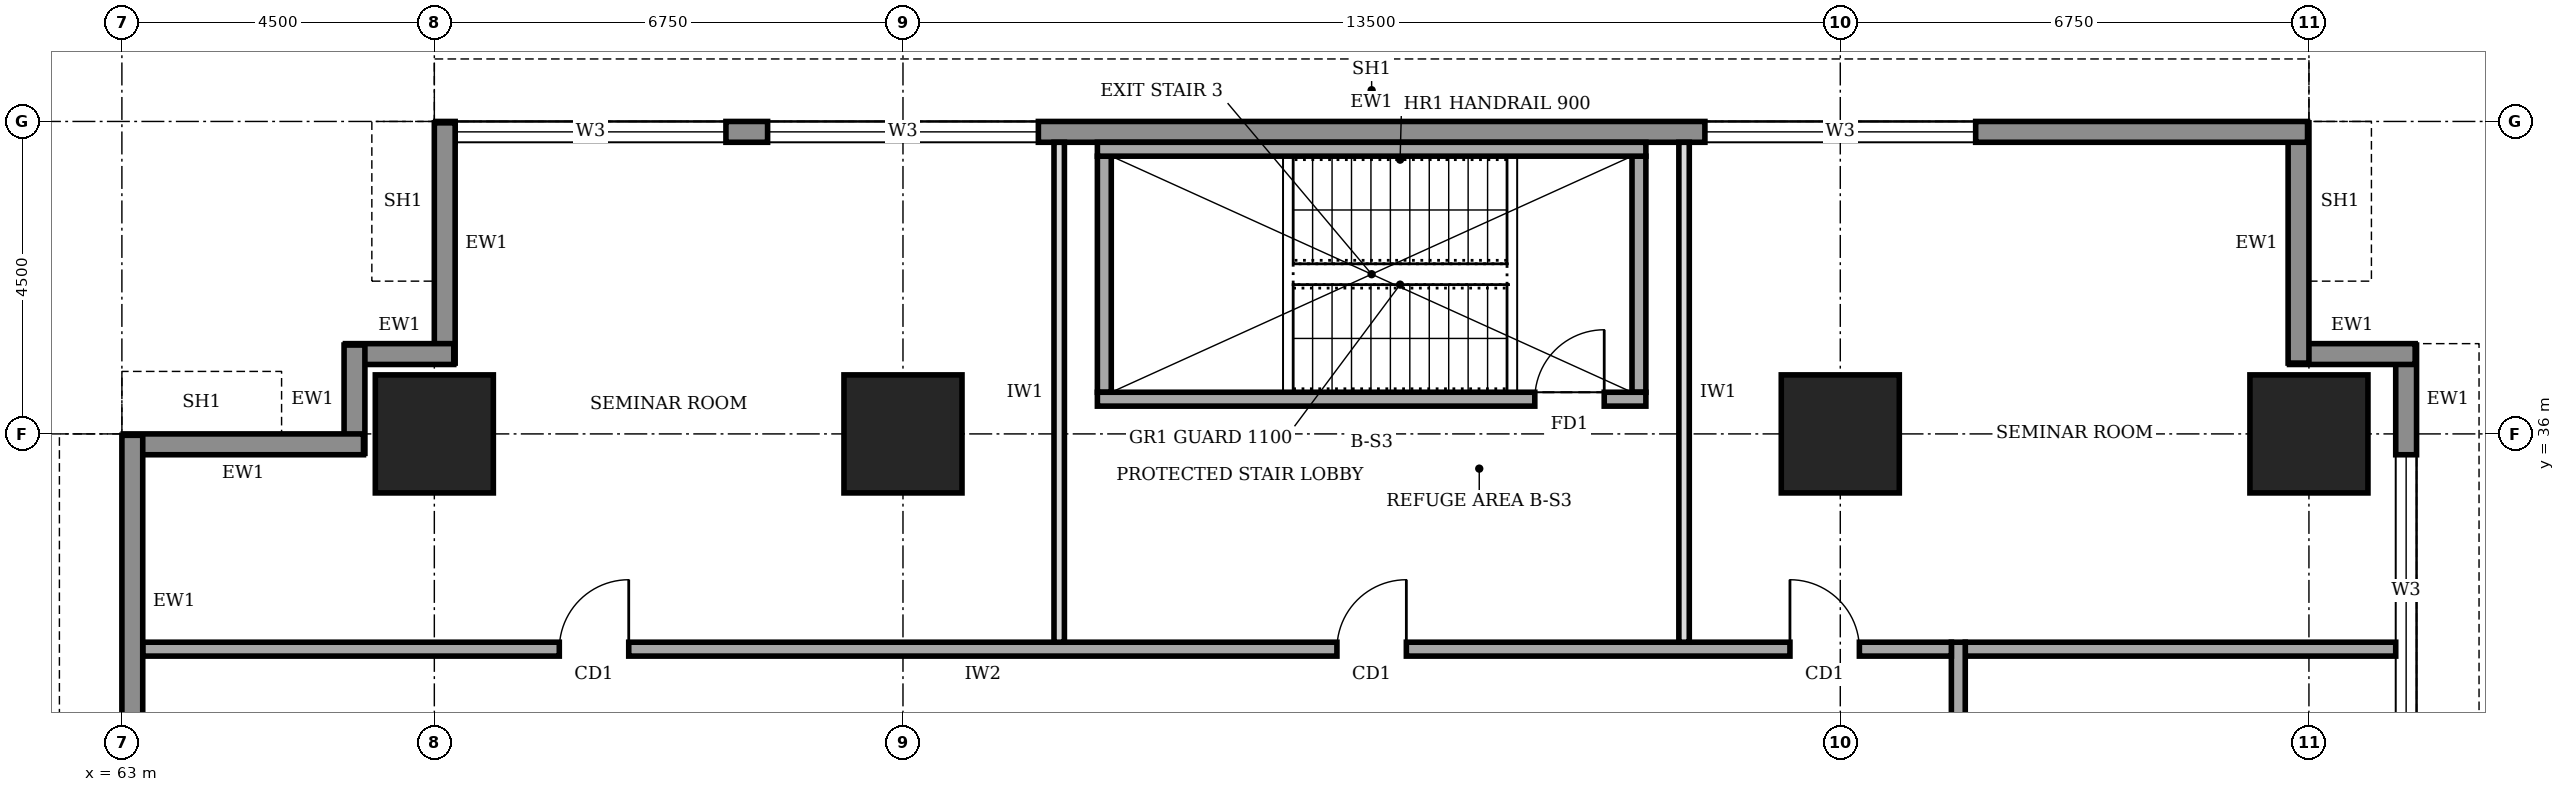
"""IFC4 building model, lengths in metres.
Left out: names, types, materials, properties, quantities, classifications, styles, units other than length and angle.
Written with IfcOpenShell. Run it as: python <this file> out.ifc"""

import sys

from ifc_helpers import new_model, si_unit, direction, frame, frame_2d, origin, origin_2d, place, context, subcontext, project, spatial, rectangle, extrude, element, fill, save


model = new_model("IFC4")
c1 = context("Model", 3, precision=1e-05, world=origin(), true_north=direction((0.0, 1.0)))
c2 = subcontext(c1, "Body", "Model", "MODEL_VIEW")
j1 = project(units=[si_unit("LENGTHUNIT", "METRE"), si_unit("PLANEANGLEUNIT", "RADIAN")], contexts=[c1])
p1 = place(None, origin())
s1 = spatial("IfcSite", under=j1, at=p1, CompositionType="ELEMENT")
p2 = place(p1, origin())
s2 = spatial("IfcBuilding", under=s1, at=p2, CompositionType="ELEMENT")
p3 = place(p2, frame((0.0, 0.0, 85.0)))
s3 = spatial("IfcBuildingStorey", under=s2, at=p3, CompositionType="ELEMENT", Elevation=85.0)
for number, where, z_axis, x_axis in (
    (1, (67.5, 36.0, 0.0), (0.0, 0.0, 1.0), (1.0, 0.0, 0.0)),
    (2, (74.25, 36.0, 0.0), (0.0, 0.0, 1.0), (1.0, 0.0, 0.0)),
    (3, (87.75, 36.0, 0.0), (0.0, 0.0, 1.0), (1.0, 0.0, 0.0)),
    (4, (94.5, 36.0, 0.0), (0.0, 0.0, 1.0), (1.0, 0.0, 0.0)),
):
    element("IfcColumn", number, at=place(p3, frame(where, z_axis=z_axis, x_axis=x_axis)), inside=s3, PredefinedType="COLUMN", context=c2, shape_type="SweptSolid", body=[
        extrude(rectangle(XDim=1.7, YDim=1.7, at=origin_2d()), origin(), (0.0, 0.0, 1.0), 4.0),
    ])
p4 = place(p3, frame((95.9, 3.32, 0.0), z_axis=(0.0, 0.0, 1.0), x_axis=(0.0, 1.0, 0.0)))
e5 = element("IfcWall", 5, at=p4, inside=s3, PredefinedType="STANDARD", context=c2, shape_type="SweptSolid", body=[
    extrude(rectangle(XDim=33.96, YDim=0.3, at=frame_2d((16.98, 0.0))), origin(), (0.0, 0.0, 1.0), 3.75),
])
p5 = place(p4, frame((1.48, 0.0, 0.95)))
e6 = element("IfcOpeningElement", 6, at=p5, cuts=e5, PredefinedType="OPENING", context=c2, shape_type="SweptSolid", body=[
    extrude(rectangle(XDim=3.9, YDim=1.8, at=frame_2d((1.95, 0.9))), frame((0.0, 0.16, 0.0), z_axis=(0.0, -1.0, 0.0), x_axis=(1.0, 0.0, 0.0)), (0.0, 0.0, 1.0), 0.32),
])
p6 = place(p4, frame((5.98, 0.0, 0.95)))
e7 = element("IfcOpeningElement", 7, at=p6, cuts=e5, PredefinedType="OPENING", context=c2, shape_type="SweptSolid", body=[
    extrude(rectangle(XDim=3.9, YDim=1.8, at=frame_2d((1.95, 0.9))), frame((0.0, 0.16, 0.0), z_axis=(0.0, -1.0, 0.0), x_axis=(1.0, 0.0, 0.0)), (0.0, 0.0, 1.0), 0.32),
])
p7 = place(p4, frame((10.48, 0.0, 0.95)))
e8 = element("IfcOpeningElement", 8, at=p7, cuts=e5, PredefinedType="OPENING", context=c2, shape_type="SweptSolid", body=[
    extrude(rectangle(XDim=3.9, YDim=1.8, at=frame_2d((1.95, 0.9))), frame((0.0, 0.16, 0.0), z_axis=(0.0, -1.0, 0.0), x_axis=(1.0, 0.0, 0.0)), (0.0, 0.0, 1.0), 0.32),
])
p8 = place(p4, frame((14.98, 0.0, 0.95)))
e9 = element("IfcOpeningElement", 9, at=p8, cuts=e5, PredefinedType="OPENING", context=c2, shape_type="SweptSolid", body=[
    extrude(rectangle(XDim=3.9, YDim=1.8, at=frame_2d((1.95, 0.9))), frame((0.0, 0.16, 0.0), z_axis=(0.0, -1.0, 0.0), x_axis=(1.0, 0.0, 0.0)), (0.0, 0.0, 1.0), 0.32),
])
p9 = place(p4, frame((19.48, 0.0, 0.95)))
e10 = element("IfcOpeningElement", 10, at=p9, cuts=e5, PredefinedType="OPENING", context=c2, shape_type="SweptSolid", body=[
    extrude(rectangle(XDim=3.9, YDim=1.8, at=frame_2d((1.95, 0.9))), frame((0.0, 0.16, 0.0), z_axis=(0.0, -1.0, 0.0), x_axis=(1.0, 0.0, 0.0)), (0.0, 0.0, 1.0), 0.32),
])
p10 = place(p4, frame((23.98, 0.0, 0.95)))
e11 = element("IfcOpeningElement", 11, at=p10, cuts=e5, PredefinedType="OPENING", context=c2, shape_type="SweptSolid", body=[
    extrude(rectangle(XDim=3.9, YDim=1.8, at=frame_2d((1.95, 0.9))), frame((0.0, 0.16, 0.0), z_axis=(0.0, -1.0, 0.0), x_axis=(1.0, 0.0, 0.0)), (0.0, 0.0, 1.0), 0.32),
])
p11 = place(p4, frame((28.48, 0.0, 0.95)))
e12 = element("IfcOpeningElement", 12, at=p11, cuts=e5, PredefinedType="OPENING", context=c2, shape_type="SweptSolid", body=[
    extrude(rectangle(XDim=3.9, YDim=1.8, at=frame_2d((1.95, 0.9))), frame((0.0, 0.16, 0.0), z_axis=(0.0, -1.0, 0.0), x_axis=(1.0, 0.0, 0.0)), (0.0, 0.0, 1.0), 0.32),
])
p12 = place(p3, frame((96.03, 37.15, 0.0), z_axis=(0.0, 0.0, 1.0), x_axis=(-1.0, 0.0, 0.0)))
e13 = element("IfcWall", 13, at=p12, inside=s3, PredefinedType="STANDARD", context=c2, shape_type="SweptSolid", body=[
    extrude(rectangle(XDim=1.81, YDim=0.3, at=frame_2d((0.905, 0.0))), origin(), (0.0, 0.0, 1.0), 3.75),
])
p13 = place(p3, frame((94.35, 37.02, 0.0), z_axis=(0.0, 0.0, 1.0), x_axis=(0.0, 1.0, 0.0)))
e14 = element("IfcWall", 14, at=p13, inside=s3, PredefinedType="STANDARD", context=c2, shape_type="SweptSolid", body=[
    extrude(rectangle(XDim=3.46, YDim=0.3, at=frame_2d((1.73, 0.0))), origin(), (0.0, 0.0, 1.0), 2.85),
])
p14 = place(p3, frame((94.48, 40.35, 0.0), z_axis=(0.0, 0.0, 1.0), x_axis=(-1.0, 0.0, 0.0)))
e15 = element("IfcWall", 15, at=p14, inside=s3, PredefinedType="STANDARD", context=c2, shape_type="SweptSolid", body=[
    extrude(rectangle(XDim=26.96, YDim=0.3, at=frame_2d((13.48, 0.0))), origin(), (0.0, 0.0, 1.0), 3.75),
])
p15 = place(p14, frame((22.78, 0.0, 0.95)))
e16 = element("IfcOpeningElement", 16, at=p15, cuts=e15, PredefinedType="OPENING", context=c2, shape_type="SweptSolid", body=[
    extrude(rectangle(XDim=3.9, YDim=1.8, at=frame_2d((1.95, 0.9))), frame((0.0, 0.16, 0.0), z_axis=(0.0, -1.0, 0.0), x_axis=(1.0, 0.0, 0.0)), (0.0, 0.0, 1.0), 0.32),
])
p16 = place(p14, frame((18.28, 0.0, 0.95)))
e17 = element("IfcOpeningElement", 17, at=p16, cuts=e15, PredefinedType="OPENING", context=c2, shape_type="SweptSolid", body=[
    extrude(rectangle(XDim=3.9, YDim=1.8, at=frame_2d((1.95, 0.9))), frame((0.0, 0.16, 0.0), z_axis=(0.0, -1.0, 0.0), x_axis=(1.0, 0.0, 0.0)), (0.0, 0.0, 1.0), 0.32),
])
p17 = place(p14, frame((4.78, 0.0, 0.95)))
e18 = element("IfcOpeningElement", 18, at=p17, cuts=e15, PredefinedType="OPENING", context=c2, shape_type="SweptSolid", body=[
    extrude(rectangle(XDim=3.9, YDim=1.8, at=frame_2d((1.95, 0.9))), frame((0.0, 0.16, 0.0), z_axis=(0.0, -1.0, 0.0), x_axis=(1.0, 0.0, 0.0)), (0.0, 0.0, 1.0), 0.32),
])
p18 = place(p3, frame((67.65, 40.48, 0.0), z_axis=(0.0, 0.0, 1.0), x_axis=(0.0, -1.0, 0.0)))
e19 = element("IfcWall", 19, at=p18, inside=s3, PredefinedType="STANDARD", context=c2, shape_type="SweptSolid", body=[
    extrude(rectangle(XDim=3.46, YDim=0.3, at=frame_2d((1.73, 0.0))), origin(), (0.0, 0.0, 1.0), 2.85),
])
for number, where, z_axis, x_axis in (
    (20, (67.78, 37.15, 0.0), (0.0, 0.0, 1.0), (-1.0, 0.0, 0.0)),
    (21, (66.35, 37.28, 0.0), (0.0, 0.0, 1.0), (0.0, -1.0, 0.0)),
):
    element("IfcWall", number, at=place(p3, frame(where, z_axis=z_axis, x_axis=x_axis)), inside=s3, PredefinedType="STANDARD", context=c2, shape_type="SweptSolid", body=[
        extrude(rectangle(XDim=1.56, YDim=0.3, at=frame_2d((0.78, 0.0))), origin(), (0.0, 0.0, 1.0), 3.75),
    ])
p19 = place(p3, frame((66.48, 35.85, 0.0), z_axis=(0.0, 0.0, 1.0), x_axis=(-1.0, 0.0, 0.0)))
e22 = element("IfcWall", 22, at=p19, inside=s3, PredefinedType="STANDARD", context=c2, shape_type="SweptSolid", body=[
    extrude(rectangle(XDim=3.46, YDim=0.3, at=frame_2d((1.73, 0.0))), origin(), (0.0, 0.0, 1.0), 2.85),
])
p20 = place(p3, frame((63.15, 35.98, 0.0), z_axis=(0.0, 0.0, 1.0), x_axis=(0.0, -1.0, 0.0)))
e23 = element("IfcWall", 23, at=p20, inside=s3, PredefinedType="STANDARD", context=c2, shape_type="SweptSolid", body=[
    extrude(rectangle(XDim=31.46, YDim=0.3, at=frame_2d((15.73, 0.0))), origin(), (0.0, 0.0, 1.0), 3.75),
])
p21 = place(p20, frame((27.28, 0.0, 0.95)))
e24 = element("IfcOpeningElement", 24, at=p21, cuts=e23, PredefinedType="OPENING", context=c2, shape_type="SweptSolid", body=[
    extrude(rectangle(XDim=3.9, YDim=1.8, at=frame_2d((1.95, 0.9))), frame((0.0, 0.16, 0.0), z_axis=(0.0, -1.0, 0.0), x_axis=(1.0, 0.0, 0.0)), (0.0, 0.0, 1.0), 0.32),
])
p22 = place(p20, frame((22.78, 0.0, 0.95)))
e25 = element("IfcOpeningElement", 25, at=p22, cuts=e23, PredefinedType="OPENING", context=c2, shape_type="SweptSolid", body=[
    extrude(rectangle(XDim=3.9, YDim=1.8, at=frame_2d((1.95, 0.9))), frame((0.0, 0.16, 0.0), z_axis=(0.0, -1.0, 0.0), x_axis=(1.0, 0.0, 0.0)), (0.0, 0.0, 1.0), 0.32),
])
p23 = place(p20, frame((18.28, 0.0, 0.95)))
e26 = element("IfcOpeningElement", 26, at=p23, cuts=e23, PredefinedType="OPENING", context=c2, shape_type="SweptSolid", body=[
    extrude(rectangle(XDim=3.9, YDim=1.8, at=frame_2d((1.95, 0.9))), frame((0.0, 0.16, 0.0), z_axis=(0.0, -1.0, 0.0), x_axis=(1.0, 0.0, 0.0)), (0.0, 0.0, 1.0), 0.32),
])
p24 = place(p20, frame((13.78, 0.0, 0.95)))
e27 = element("IfcOpeningElement", 27, at=p24, cuts=e23, PredefinedType="OPENING", context=c2, shape_type="SweptSolid", body=[
    extrude(rectangle(XDim=3.9, YDim=1.8, at=frame_2d((1.95, 0.9))), frame((0.0, 0.16, 0.0), z_axis=(0.0, -1.0, 0.0), x_axis=(1.0, 0.0, 0.0)), (0.0, 0.0, 1.0), 0.32),
])
p25 = place(p20, frame((9.28, 0.0, 0.95)))
e28 = element("IfcOpeningElement", 28, at=p25, cuts=e23, PredefinedType="OPENING", context=c2, shape_type="SweptSolid", body=[
    extrude(rectangle(XDim=3.9, YDim=1.8, at=frame_2d((1.95, 0.9))), frame((0.0, 0.16, 0.0), z_axis=(0.0, -1.0, 0.0), x_axis=(1.0, 0.0, 0.0)), (0.0, 0.0, 1.0), 0.32),
])
p26 = place(p20, frame((4.78, 0.0, 0.95)))
e29 = element("IfcOpeningElement", 29, at=p26, cuts=e23, PredefinedType="OPENING", context=c2, shape_type="SweptSolid", body=[
    extrude(rectangle(XDim=3.9, YDim=1.8, at=frame_2d((1.95, 0.9))), frame((0.0, 0.16, 0.0), z_axis=(0.0, -1.0, 0.0), x_axis=(1.0, 0.0, 0.0)), (0.0, 0.0, 1.0), 0.32),
])
p27 = place(p3, frame((89.45, 7.7, 0.0), z_axis=(0.0, 0.0, 1.0), x_axis=(0.0, 1.0, 0.0)))
e30 = element("IfcWall", 30, at=p27, inside=s3, PredefinedType="SOLIDWALL", context=c2, shape_type="SweptSolid", body=[
    extrude(rectangle(XDim=25.3, YDim=0.2, at=frame_2d((12.65, 0.0))), origin(), (0.0, 0.0, 1.0), 3.75),
])
p28 = place(p27, frame((2.3, 0.0, 0.0)))
e31 = element("IfcOpeningElement", 31, at=p28, cuts=e30, PredefinedType="OPENING", context=c2, shape_type="SweptSolid", body=[
    extrude(rectangle(XDim=1.0, YDim=2.1, at=frame_2d((0.5, 1.05))), frame((0.0, 0.11, 0.0), z_axis=(0.0, -1.0, 0.0), x_axis=(1.0, 0.0, 0.0)), (0.0, 0.0, 1.0), 0.22),
])
p29 = place(p27, frame((6.4, 0.0, 0.0)))
e32 = element("IfcOpeningElement", 32, at=p29, cuts=e30, PredefinedType="OPENING", context=c2, shape_type="SweptSolid", body=[
    extrude(rectangle(XDim=1.0, YDim=2.1, at=frame_2d((0.5, 1.05))), frame((0.0, 0.11, 0.0), z_axis=(0.0, -1.0, 0.0), x_axis=(1.0, 0.0, 0.0)), (0.0, 0.0, 1.0), 0.22),
])
p30 = place(p27, frame((9.5, 0.0, 0.0)))
e33 = element("IfcOpeningElement", 33, at=p30, cuts=e30, PredefinedType="OPENING", context=c2, shape_type="SweptSolid", body=[
    extrude(rectangle(XDim=0.9, YDim=2.1, at=frame_2d((0.45, 1.05))), frame((0.0, 0.11, 0.0), z_axis=(0.0, -1.0, 0.0), x_axis=(1.0, 0.0, 0.0)), (0.0, 0.0, 1.0), 0.22),
])
p31 = place(p27, frame((12.55, 0.0, 0.0)))
e34 = element("IfcOpeningElement", 34, at=p31, cuts=e30, PredefinedType="OPENING", context=c2, shape_type="SweptSolid", body=[
    extrude(rectangle(XDim=0.9, YDim=2.1, at=frame_2d((0.45, 1.05))), frame((0.0, 0.11, 0.0), z_axis=(0.0, -1.0, 0.0), x_axis=(1.0, 0.0, 0.0)), (0.0, 0.0, 1.0), 0.22),
])
p32 = place(p27, frame((17.25, 0.0, 0.0)))
e35 = element("IfcOpeningElement", 35, at=p32, cuts=e30, PredefinedType="OPENING", context=c2, shape_type="SweptSolid", body=[
    extrude(rectangle(XDim=0.9, YDim=2.1, at=frame_2d((0.45, 1.05))), frame((0.0, 0.11, 0.0), z_axis=(0.0, -1.0, 0.0), x_axis=(1.0, 0.0, 0.0)), (0.0, 0.0, 1.0), 0.22),
])
p33 = place(p27, frame((14.6, 0.0, 0.0)))
e36 = element("IfcOpeningElement", 36, at=p33, cuts=e30, PredefinedType="OPENING", context=c2, shape_type="SweptSolid", body=[
    extrude(rectangle(XDim=1.0, YDim=2.1, at=frame_2d((0.5, 1.05))), frame((0.0, 0.11, 0.0), z_axis=(0.0, -1.0, 0.0), x_axis=(1.0, 0.0, 0.0)), (0.0, 0.0, 1.0), 0.22),
])
p34 = place(p27, frame((21.8, 0.0, 0.0)))
e37 = element("IfcOpeningElement", 37, at=p34, cuts=e30, PredefinedType="OPENING", context=c2, shape_type="SweptSolid", body=[
    extrude(rectangle(XDim=1.0, YDim=2.1, at=frame_2d((0.5, 1.05))), frame((0.0, 0.11, 0.0), z_axis=(0.0, -1.0, 0.0), x_axis=(1.0, 0.0, 0.0)), (0.0, 0.0, 1.0), 0.22),
])
p35 = place(p3, frame((89.35, 32.9, 0.0), z_axis=(0.0, 0.0, 1.0), x_axis=(-1.0, 0.0, 0.0)))
e38 = element("IfcWall", 38, at=p35, inside=s3, PredefinedType="SOLIDWALL", context=c2, shape_type="SweptSolid", body=[
    extrude(rectangle(XDim=26.05, YDim=0.2, at=frame_2d((13.025, 0.0))), origin(), (0.0, 0.0, 1.0), 3.75),
])
p36 = place(p35, frame((19.05, 0.0, 0.0)))
e39 = element("IfcOpeningElement", 39, at=p36, cuts=e38, PredefinedType="OPENING", context=c2, shape_type="SweptSolid", body=[
    extrude(rectangle(XDim=1.0, YDim=2.1, at=frame_2d((0.5, 1.05))), frame((0.0, 0.11, 0.0), z_axis=(0.0, -1.0, 0.0), x_axis=(1.0, 0.0, 0.0)), (0.0, 0.0, 1.0), 0.22),
])
p37 = place(p35, frame((7.85, 0.0, 0.0)))
e40 = element("IfcOpeningElement", 40, at=p37, cuts=e38, PredefinedType="OPENING", context=c2, shape_type="SweptSolid", body=[
    extrude(rectangle(XDim=1.0, YDim=2.1, at=frame_2d((0.5, 1.05))), frame((0.0, 0.11, 0.0), z_axis=(0.0, -1.0, 0.0), x_axis=(1.0, 0.0, 0.0)), (0.0, 0.0, 1.0), 0.22),
])
p38 = place(p35, frame((1.325, 0.0, 0.0)))
e41 = element("IfcOpeningElement", 41, at=p38, cuts=e38, PredefinedType="OPENING", context=c2, shape_type="SweptSolid", body=[
    extrude(rectangle(XDim=1.0, YDim=2.1, at=frame_2d((0.5, 1.05))), frame((0.0, 0.11, 0.0), z_axis=(0.0, -1.0, 0.0), x_axis=(1.0, 0.0, 0.0)), (0.0, 0.0, 1.0), 0.22),
])
p39 = place(p3, frame((89.55, 32.9, 0.0), z_axis=(0.0, 0.0, 1.0), x_axis=(1.0, 0.0, 0.0)))
e42 = element("IfcWall", 42, at=p39, inside=s3, PredefinedType="SOLIDWALL", context=c2, shape_type="SweptSolid", body=[
    extrude(rectangle(XDim=6.2, YDim=0.2, at=frame_2d((3.1, 0.0))), origin(), (0.0, 0.0, 1.0), 3.75),
])
for number, where, z_axis, x_axis in (
    (43, (76.5, 33.0, 0.0), (0.0, 0.0, 1.0), (0.0, 1.0, 0.0)),
    (44, (85.5, 33.0, 0.0), (0.0, 0.0, 1.0), (0.0, 1.0, 0.0)),
):
    element("IfcWall", number, at=place(p3, frame(where, z_axis=z_axis, x_axis=x_axis)), inside=s3, PredefinedType="PARTITIONING", context=c2, shape_type="SweptSolid", body=[
        extrude(rectangle(XDim=7.2, YDim=0.15, at=frame_2d((3.6, 0.0))), origin(), (0.0, 0.0, 1.0), 3.75),
    ])
p40 = place(p3, frame((77.05, 36.5, 0.0), z_axis=(0.0, 0.0, 1.0), x_axis=(1.0, 0.0, 0.0)))
e45 = element("IfcWall", 45, at=p40, inside=s3, PredefinedType="SOLIDWALL", context=c2, shape_type="SweptSolid", body=[
    extrude(rectangle(XDim=7.9, YDim=0.2, at=frame_2d((3.95, 0.0))), origin(), (0.0, 0.0, 1.0), 3.75),
])
p41 = place(p40, frame((6.3, 0.0, 0.0)))
e46 = element("IfcOpeningElement", 46, at=p41, cuts=e45, PredefinedType="OPENING", context=c2, shape_type="SweptSolid", body=[
    extrude(rectangle(XDim=1.0, YDim=2.1, at=frame_2d((0.5, 1.05))), frame((0.0, 0.11, 0.0), z_axis=(0.0, -1.0, 0.0), x_axis=(1.0, 0.0, 0.0)), (0.0, 0.0, 1.0), 0.22),
])
p42 = place(p3, frame((77.05, 40.1, 0.0), z_axis=(0.0, 0.0, 1.0), x_axis=(1.0, 0.0, 0.0)))
e47 = element("IfcWall", 47, at=p42, inside=s3, PredefinedType="SOLIDWALL", context=c2, shape_type="SweptSolid", body=[
    extrude(rectangle(XDim=7.9, YDim=0.2, at=frame_2d((3.95, 0.0))), origin(), (0.0, 0.0, 1.0), 3.75),
])
for number, where, z_axis, x_axis in (
    (48, (77.15, 36.6, 0.0), (0.0, 0.0, 1.0), (0.0, 1.0, 0.0)),
    (49, (84.85, 36.6, 0.0), (0.0, 0.0, 1.0), (0.0, 1.0, 0.0)),
):
    element("IfcWall", number, at=place(p3, frame(where, z_axis=z_axis, x_axis=x_axis)), inside=s3, PredefinedType="SOLIDWALL", context=c2, shape_type="SweptSolid", body=[
        extrude(rectangle(XDim=3.4, YDim=0.2, at=frame_2d((1.7, 0.0))), origin(), (0.0, 0.0, 1.0), 3.75),
    ])
p43 = place(p11, origin())
e50 = element("IfcWindow", 50, at=p43, inside=s3, PartitioningType="SINGLE_PANEL", PredefinedType="WINDOW", context=c2, shape_type="SweptSolid", body=[
    extrude(rectangle(XDim=3.9, YDim=1.8, at=frame_2d((1.95, 0.9))), frame((0.0, 0.03, 0.0), z_axis=(0.0, -1.0, 0.0), x_axis=(1.0, 0.0, 0.0)), (0.0, 0.0, 1.0), 0.06),
])
fill(e12, e50)
p44 = place(p15, origin())
e51 = element("IfcWindow", 51, at=p44, inside=s3, PartitioningType="SINGLE_PANEL", PredefinedType="WINDOW", context=c2, shape_type="SweptSolid", body=[
    extrude(rectangle(XDim=3.9, YDim=1.8, at=frame_2d((1.95, 0.9))), frame((0.0, 0.03, 0.0), z_axis=(0.0, -1.0, 0.0), x_axis=(1.0, 0.0, 0.0)), (0.0, 0.0, 1.0), 0.06),
])
fill(e16, e51)
p45 = place(p16, origin())
e52 = element("IfcWindow", 52, at=p45, inside=s3, PartitioningType="SINGLE_PANEL", PredefinedType="WINDOW", context=c2, shape_type="SweptSolid", body=[
    extrude(rectangle(XDim=3.9, YDim=1.8, at=frame_2d((1.95, 0.9))), frame((0.0, 0.03, 0.0), z_axis=(0.0, -1.0, 0.0), x_axis=(1.0, 0.0, 0.0)), (0.0, 0.0, 1.0), 0.06),
])
fill(e17, e52)
p46 = place(p17, origin())
e53 = element("IfcWindow", 53, at=p46, inside=s3, PartitioningType="SINGLE_PANEL", PredefinedType="WINDOW", context=c2, shape_type="SweptSolid", body=[
    extrude(rectangle(XDim=3.9, YDim=1.8, at=frame_2d((1.95, 0.9))), frame((0.0, 0.03, 0.0), z_axis=(0.0, -1.0, 0.0), x_axis=(1.0, 0.0, 0.0)), (0.0, 0.0, 1.0), 0.06),
])
fill(e18, e53)
p47 = place(p36, frame((1.0, 0.0, 0.0), z_axis=(0.0, 0.0, 1.0), x_axis=(-1.0, 0.0, 0.0)))
e54 = element("IfcDoor", 54, at=p47, inside=s3, OperationType="SINGLE_SWING_RIGHT", PredefinedType="DOOR", context=c2, shape_type="SweptSolid", body=[
    extrude(rectangle(XDim=1.0, YDim=2.1, at=frame_2d((0.5, 1.05))), frame((0.0, 0.025, 0.0), z_axis=(0.0, -1.0, 0.0), x_axis=(1.0, 0.0, 0.0)), (0.0, 0.0, 1.0), 0.05),
])
fill(e39, e54)
p48 = place(p37, frame((1.0, 0.0, 0.0), z_axis=(0.0, 0.0, 1.0), x_axis=(-1.0, 0.0, 0.0)))
e55 = element("IfcDoor", 55, at=p48, inside=s3, OperationType="SINGLE_SWING_RIGHT", PredefinedType="DOOR", context=c2, shape_type="SweptSolid", body=[
    extrude(rectangle(XDim=1.0, YDim=2.1, at=frame_2d((0.5, 1.05))), frame((0.0, 0.025, 0.0), z_axis=(0.0, -1.0, 0.0), x_axis=(1.0, 0.0, 0.0)), (0.0, 0.0, 1.0), 0.05),
])
fill(e40, e55)
p49 = place(p38, frame((1.0, 0.0, 0.0), z_axis=(0.0, 0.0, 1.0), x_axis=(-1.0, 0.0, 0.0)))
e56 = element("IfcDoor", 56, at=p49, inside=s3, OperationType="SINGLE_SWING_LEFT", PredefinedType="DOOR", context=c2, shape_type="SweptSolid", body=[
    extrude(rectangle(XDim=1.0, YDim=2.1, at=frame_2d((0.5, 1.05))), frame((0.0, 0.025, 0.0), z_axis=(0.0, -1.0, 0.0), x_axis=(1.0, 0.0, 0.0)), (0.0, 0.0, 1.0), 0.05),
])
fill(e41, e56)
p50 = place(p41, origin())
e57 = element("IfcDoor", 57, at=p50, inside=s3, OperationType="SINGLE_SWING_RIGHT", PredefinedType="DOOR", context=c2, shape_type="SweptSolid", body=[
    extrude(rectangle(XDim=1.0, YDim=2.1, at=frame_2d((0.5, 1.05))), frame((0.0, 0.025, 0.0), z_axis=(0.0, -1.0, 0.0), x_axis=(1.0, 0.0, 0.0)), (0.0, 0.0, 1.0), 0.05),
])
fill(e46, e57)
save(model, sys.argv[1])
